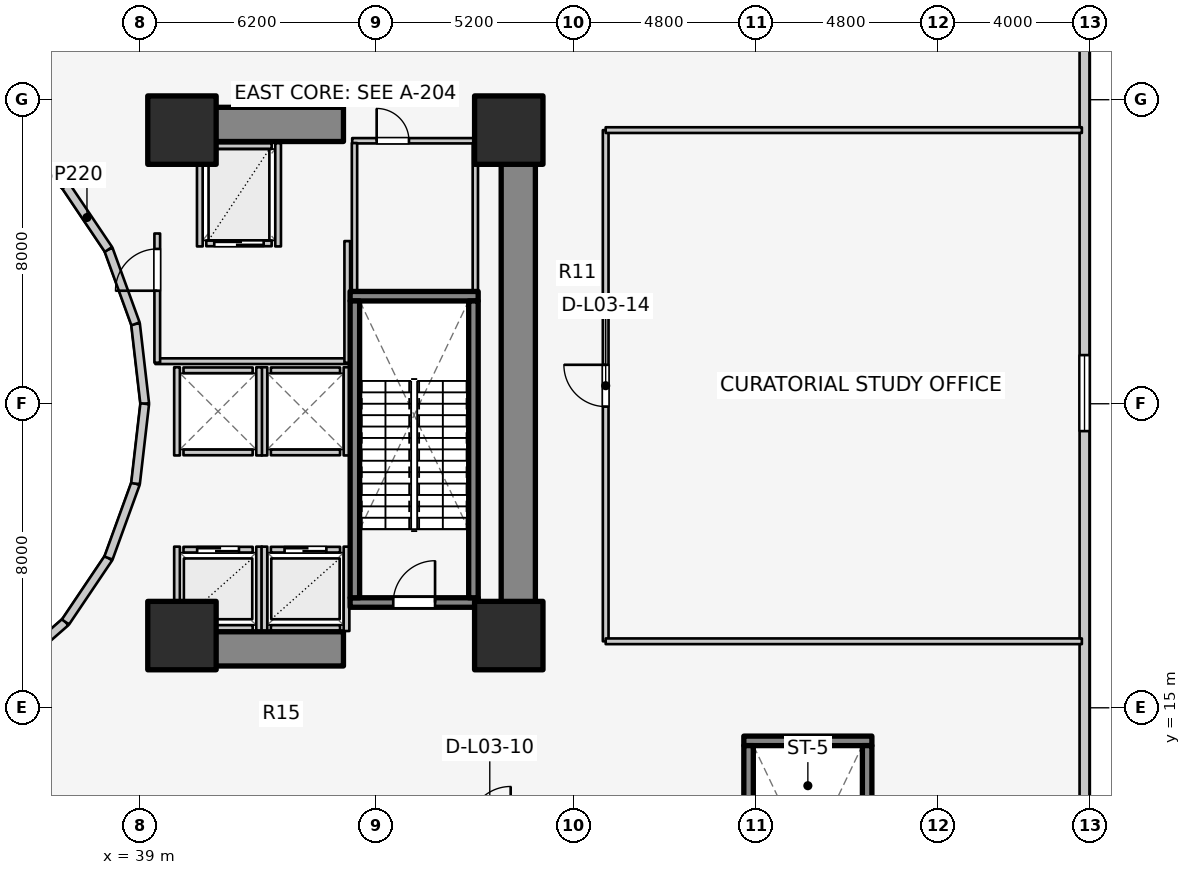
"""IFC4 building model, lengths in metres.
Left out: names, types, materials, properties, quantities, classifications, styles, units other than length and angle.
Written with IfcOpenShell. Run it as: python <this file> out.ifc"""

import sys

from ifc_helpers import new_model, si_unit, direction, frame, frame_2d, origin, origin_2d, place, context, subcontext, project, spatial, rectangle, extrude, element, fill, save


model = new_model("IFC4")
c1 = context("Model", 3, precision=1e-05, world=origin(), true_north=direction((0.0, 1.0)))
c2 = subcontext(c1, "Body", "Model", "MODEL_VIEW")
j1 = project(units=[si_unit("LENGTHUNIT", "METRE"), si_unit("PLANEANGLEUNIT", "RADIAN")], contexts=[c1])
p1 = place(None, origin())
s1 = spatial("IfcSite", under=j1, at=p1, CompositionType="ELEMENT")
p2 = place(p1, origin())
s2 = spatial("IfcBuilding", under=s1, at=p2, CompositionType="ELEMENT")
p3 = place(p2, frame((0.0, 0.0, 9.2)))
s3 = spatial("IfcBuildingStorey", under=s2, at=p3, CompositionType="ELEMENT", Elevation=9.2)
p4 = place(p3, frame((48.95, 17.05, 0.0), z_axis=(0.0, 0.0, 1.0), x_axis=(0.0, 1.0, 0.0)))
e1 = element("IfcWall", 1, at=p4, inside=s3, PredefinedType="SHEAR", context=c2, shape_type="SweptSolid", body=[
    extrude(rectangle(XDim=12.8, YDim=0.9, at=frame_2d((6.4, 0.0))), origin(), (0.0, 0.0, 1.0), 4.6),
])
for number, where, z_axis, x_axis in (
    (2, (39.85, 16.55, 0.0), (0.0, 0.0, 1.0), (1.0, 0.0, 0.0)),
    (3, (39.85, 30.35, 0.0), (0.0, 0.0, 1.0), (1.0, 0.0, 0.0)),
):
    element("IfcWall", number, at=place(p3, frame(where, z_axis=z_axis, x_axis=x_axis)), inside=s3, PredefinedType="SHEAR", context=c2, shape_type="SweptSolid", body=[
        extrude(rectangle(XDim=4.5, YDim=0.9, at=frame_2d((2.25, 0.0))), origin(), (0.0, 0.0, 1.0), 4.6),
    ])
p5 = place(p3, frame((44.525, 17.77, 0.0), z_axis=(0.0, 0.0, 1.0), x_axis=(1.0, 0.0, 0.0)))
e4 = element("IfcWall", 4, at=p5, inside=s3, PredefinedType="SOLIDWALL", context=c2, shape_type="SweptSolid", body=[
    extrude(rectangle(XDim=3.37, YDim=0.25, at=frame_2d((1.685, 0.0))), origin(), (0.0, 0.0, 1.0), 4.6),
])
p6 = place(p5, frame((1.135, 0.0, 0.0)))
e5 = element("IfcOpeningElement", 5, at=p6, cuts=e4, PredefinedType="OPENING", context=c2, shape_type="SweptSolid", body=[
    extrude(rectangle(XDim=1.1, YDim=2.1, at=frame_2d((0.55, 1.05))), frame((0.0, 0.135, 0.0), z_axis=(0.0, -1.0, 0.0), x_axis=(1.0, 0.0, 0.0)), (0.0, 0.0, 1.0), 0.27),
])
p7 = place(p3, frame((44.525, 25.83, 0.0), z_axis=(0.0, 0.0, 1.0), x_axis=(1.0, 0.0, 0.0)))
e6 = element("IfcWall", 6, at=p7, inside=s3, PredefinedType="SOLIDWALL", context=c2, shape_type="SweptSolid", body=[
    extrude(rectangle(XDim=3.37, YDim=0.25, at=frame_2d((1.685, 0.0))), origin(), (0.0, 0.0, 1.0), 4.6),
])
for number, where, z_axis, x_axis in (
    (7, (44.65, 17.895, 0.0), (0.0, 0.0, 1.0), (0.0, 1.0, 0.0)),
    (8, (47.77, 17.895, 0.0), (0.0, 0.0, 1.0), (0.0, 1.0, 0.0)),
):
    element("IfcWall", number, at=place(p3, frame(where, z_axis=z_axis, x_axis=x_axis)), inside=s3, PredefinedType="SOLIDWALL", context=c2, shape_type="SweptSolid", body=[
        extrude(rectangle(XDim=7.81, YDim=0.25, at=frame_2d((3.905, 0.0))), origin(), (0.0, 0.0, 1.0), 4.6),
    ])
p8 = place(p3, frame((54.885, 14.13, 0.0), z_axis=(0.0, 0.0, 1.0), x_axis=(1.0, 0.0, 0.0)))
e9 = element("IfcWall", 9, at=p8, inside=s3, PredefinedType="SOLIDWALL", context=c2, shape_type="SweptSolid", body=[
    extrude(rectangle(XDim=3.37, YDim=0.25, at=frame_2d((1.685, 0.0))), origin(), (0.0, 0.0, 1.0), 4.6),
])
for number, where, z_axis, x_axis in (
    (10, (55.01, 6.195, 0.0), (0.0, 0.0, 1.0), (0.0, 1.0, 0.0)),
    (11, (58.13, 6.195, 0.0), (0.0, 0.0, 1.0), (0.0, 1.0, 0.0)),
):
    element("IfcWall", number, at=place(p3, frame(where, z_axis=z_axis, x_axis=x_axis)), inside=s3, PredefinedType="SOLIDWALL", context=c2, shape_type="SweptSolid", body=[
        extrude(rectangle(XDim=7.81, YDim=0.25, at=frame_2d((3.905, 0.0))), origin(), (0.0, 0.0, 1.0), 4.6),
    ])
for number, where, z_axis, x_axis in (
    (12, (40.1, 16.9, 0.0), (0.0, 0.0, 1.0), (1.0, 0.0, 0.0)),
    (13, (48.7, 16.9, 0.0), (0.0, 0.0, 1.0), (1.0, 0.0, 0.0)),
    (14, (48.7, 30.2, 0.0), (0.0, 0.0, 1.0), (1.0, 0.0, 0.0)),
    (15, (40.1, 30.2, 0.0), (0.0, 0.0, 1.0), (1.0, 0.0, 0.0)),
):
    element("IfcColumn", number, at=place(p3, frame(where, z_axis=z_axis, x_axis=x_axis)), inside=s3, PredefinedType="COLUMN", context=c2, shape_type="SweptSolid", body=[
        extrude(rectangle(XDim=1.8, YDim=1.8, at=origin_2d()), origin(), (0.0, 0.0, 1.0), 4.6),
    ])
p9 = place(p3, frame((63.85, 0.28, 0.0), z_axis=(0.0, 0.0, 1.0), x_axis=(0.0, 1.0, 0.0)))
e16 = element("IfcWall", 16, at=p9, inside=s3, PredefinedType="STANDARD", context=c2, shape_type="SweptSolid", body=[
    extrude(rectangle(XDim=45.44, YDim=0.26, at=frame_2d((22.72, 0.0))), origin(), (0.0, 0.0, 1.0), 4.28),
])
p10 = place(p9, frame((6.0, 0.0, 2.2)))
e17 = element("IfcOpeningElement", 17, at=p10, cuts=e16, PredefinedType="OPENING", context=c2, shape_type="SweptSolid", body=[
    extrude(rectangle(XDim=2.0, YDim=1.1, at=frame_2d((1.0, 0.55))), frame((0.0, 0.14, 0.0), z_axis=(0.0, -1.0, 0.0), x_axis=(1.0, 0.0, 0.0)), (0.0, 0.0, 1.0), 0.28),
])
p11 = place(p9, frame((22.0, 0.0, 2.2)))
e18 = element("IfcOpeningElement", 18, at=p11, cuts=e16, PredefinedType="OPENING", context=c2, shape_type="SweptSolid", body=[
    extrude(rectangle(XDim=2.0, YDim=1.1, at=frame_2d((1.0, 0.55))), frame((0.0, 0.14, 0.0), z_axis=(0.0, -1.0, 0.0), x_axis=(1.0, 0.0, 0.0)), (0.0, 0.0, 1.0), 0.28),
])
p12 = place(p9, frame((38.0, 0.0, 2.2)))
e19 = element("IfcOpeningElement", 19, at=p12, cuts=e16, PredefinedType="OPENING", context=c2, shape_type="SweptSolid", body=[
    extrude(rectangle(XDim=2.0, YDim=1.1, at=frame_2d((1.0, 0.55))), frame((0.0, 0.14, 0.0), z_axis=(0.0, -1.0, 0.0), x_axis=(1.0, 0.0, 0.0)), (0.0, 0.0, 1.0), 0.28),
])
p13 = place(p3, frame((39.12, 23.0, 0.0), z_axis=(0.0, 0.0, 1.0), x_axis=(-0.114711713601, 0.993398823617, 0.0)))
e20 = element("IfcWall", 20, at=p13, inside=s3, PredefinedType="STANDARD", context=c2, shape_type="SweptSolid", body=[
    extrude(rectangle(XDim=2.115, YDim=0.23, at=frame_2d((1.058, 0.0))), origin(), (0.0, 0.0, 1.0), 3.28),
])
p14 = place(p3, frame((38.877, 25.102, 0.0), z_axis=(0.0, 0.0, 1.0), x_axis=(-0.341423187295, 0.93990968033, 0.0)))
e21 = element("IfcWall", 21, at=p14, inside=s3, PredefinedType="STANDARD", context=c2, shape_type="SweptSolid", body=[
    extrude(rectangle(XDim=2.084, YDim=0.23, at=frame_2d((1.042, 0.0))), origin(), (0.0, 0.0, 1.0), 3.28),
])
p15 = place(p3, frame((38.166, 27.06, 0.0), z_axis=(0.0, 0.0, 1.0), x_axis=(-0.558197800898, 0.829707909492, 0.0)))
e22 = element("IfcWall", 22, at=p15, inside=s3, PredefinedType="STANDARD", context=c2, shape_type="SweptSolid", body=[
    extrude(rectangle(XDim=2.027, YDim=0.23, at=frame_2d((1.013, 0.0))), origin(), (0.0, 0.0, 1.0), 3.28),
])
for number, where, z_axis, x_axis in (
    (23, (37.035, 28.742, 0.0), (0.0, 0.0, 1.0), (-0.753, 0.659, 0.0)),
    (24, (35.56, 15.968, 0.0), (0.0, 0.0, 1.0), (0.753, 0.659, 0.0)),
):
    element("IfcWall", number, at=place(p3, frame(where, z_axis=z_axis, x_axis=x_axis)), inside=s3, PredefinedType="STANDARD", context=c2, shape_type="SweptSolid", body=[
        extrude(rectangle(XDim=1.959, YDim=0.23, at=frame_2d((0.98, 0.0))), origin(), (0.0, 0.0, 1.0), 3.28),
    ])
p16 = place(p3, frame((37.035, 17.258, 0.0), z_axis=(0.0, 0.0, 1.0), x_axis=(0.558197800898, 0.829707909492, 0.0)))
e25 = element("IfcWall", 25, at=p16, inside=s3, PredefinedType="STANDARD", context=c2, shape_type="SweptSolid", body=[
    extrude(rectangle(XDim=2.027, YDim=0.23, at=frame_2d((1.013, 0.0))), origin(), (0.0, 0.0, 1.0), 3.28),
])
p17 = place(p3, frame((38.166, 18.94, 0.0), z_axis=(0.0, 0.0, 1.0), x_axis=(0.341423187295, 0.93990968033, 0.0)))
e26 = element("IfcWall", 26, at=p17, inside=s3, PredefinedType="STANDARD", context=c2, shape_type="SweptSolid", body=[
    extrude(rectangle(XDim=2.084, YDim=0.23, at=frame_2d((1.042, 0.0))), origin(), (0.0, 0.0, 1.0), 3.28),
])
p18 = place(p3, frame((38.877, 20.898, 0.0), z_axis=(0.0, 0.0, 1.0), x_axis=(0.114711713601, 0.993398823617, 0.0)))
e27 = element("IfcWall", 27, at=p18, inside=s3, PredefinedType="STANDARD", context=c2, shape_type="SweptSolid", body=[
    extrude(rectangle(XDim=2.115, YDim=0.23, at=frame_2d((1.058, 0.0))), origin(), (0.0, 0.0, 1.0), 3.28),
])
p19 = place(p3, frame((40.14, 19.16, 0.0), z_axis=(0.0, 0.0, 1.0), x_axis=(1.0, 0.0, 0.0)))
e28 = element("IfcWall", 28, at=p19, inside=s3, PredefinedType="SOLIDWALL", context=c2, shape_type="SweptSolid", body=[
    extrude(rectangle(XDim=1.82, YDim=0.15, at=frame_2d((0.91, 0.0))), origin(), (0.0, 0.0, 1.0), 3.62),
])
p20 = place(p19, frame((0.36, 0.0, 0.0)))
e29 = element("IfcOpeningElement", 29, at=p20, cuts=e28, PredefinedType="OPENING", context=c2, shape_type="SweptSolid", body=[
    extrude(rectangle(XDim=1.1, YDim=2.1, at=frame_2d((0.55, 1.05))), frame((0.0, 0.085, 0.0), z_axis=(0.0, -1.0, 0.0), x_axis=(1.0, 0.0, 0.0)), (0.0, 0.0, 1.0), 0.17),
])
p21 = place(p3, frame((40.14, 17.1, 0.0), z_axis=(0.0, 0.0, 1.0), x_axis=(1.0, 0.0, 0.0)))
e30 = element("IfcWall", 30, at=p21, inside=s3, PredefinedType="SOLIDWALL", context=c2, shape_type="SweptSolid", body=[
    extrude(rectangle(XDim=1.82, YDim=0.15, at=frame_2d((0.91, 0.0))), origin(), (0.0, 0.0, 1.0), 3.62),
])
p22 = place(p3, frame((39.97, 17.02, 0.0), z_axis=(0.0, 0.0, 1.0), x_axis=(0.0, 1.0, 0.0)))
e31 = element("IfcWall", 31, at=p22, inside=s3, PredefinedType="SOLIDWALL", context=c2, shape_type="SweptSolid", body=[
    extrude(rectangle(XDim=2.22, YDim=0.15, at=frame_2d((1.11, 0.0))), origin(), (0.0, 0.0, 1.0), 3.3),
])
p23 = place(p3, frame((42.13, 17.02, 0.0), z_axis=(0.0, 0.0, 1.0), x_axis=(0.0, 1.0, 0.0)))
e32 = element("IfcWall", 32, at=p23, inside=s3, PredefinedType="SOLIDWALL", context=c2, shape_type="SweptSolid", body=[
    extrude(rectangle(XDim=2.22, YDim=0.15, at=frame_2d((1.11, 0.0))), origin(), (0.0, 0.0, 1.0), 4.255),
])
p24 = place(p3, frame((42.44, 19.16, 0.0), z_axis=(0.0, 0.0, 1.0), x_axis=(1.0, 0.0, 0.0)))
e33 = element("IfcWall", 33, at=p24, inside=s3, PredefinedType="SOLIDWALL", context=c2, shape_type="SweptSolid", body=[
    extrude(rectangle(XDim=1.82, YDim=0.15, at=frame_2d((0.91, 0.0))), origin(), (0.0, 0.0, 1.0), 4.255),
])
p25 = place(p24, frame((0.36, 0.0, 0.0)))
e34 = element("IfcOpeningElement", 34, at=p25, cuts=e33, PredefinedType="OPENING", context=c2, shape_type="SweptSolid", body=[
    extrude(rectangle(XDim=1.1, YDim=2.1, at=frame_2d((0.55, 1.05))), frame((0.0, 0.085, 0.0), z_axis=(0.0, -1.0, 0.0), x_axis=(1.0, 0.0, 0.0)), (0.0, 0.0, 1.0), 0.17),
])
p26 = place(p3, frame((42.44, 17.1, 0.0), z_axis=(0.0, 0.0, 1.0), x_axis=(1.0, 0.0, 0.0)))
e35 = element("IfcWall", 35, at=p26, inside=s3, PredefinedType="SOLIDWALL", context=c2, shape_type="SweptSolid", body=[
    extrude(rectangle(XDim=1.82, YDim=0.15, at=frame_2d((0.91, 0.0))), origin(), (0.0, 0.0, 1.0), 4.255),
])
p27 = place(p3, frame((42.27, 17.02, 0.0), z_axis=(0.0, 0.0, 1.0), x_axis=(0.0, 1.0, 0.0)))
e36 = element("IfcWall", 36, at=p27, inside=s3, PredefinedType="SOLIDWALL", context=c2, shape_type="SweptSolid", body=[
    extrude(rectangle(XDim=2.22, YDim=0.15, at=frame_2d((1.11, 0.0))), origin(), (0.0, 0.0, 1.0), 4.255),
])
p28 = place(p3, frame((44.43, 17.02, 0.0), z_axis=(0.0, 0.0, 1.0), x_axis=(0.0, 1.0, 0.0)))
e37 = element("IfcWall", 37, at=p28, inside=s3, PredefinedType="SOLIDWALL", context=c2, shape_type="SweptSolid", body=[
    extrude(rectangle(XDim=2.22, YDim=0.15, at=frame_2d((1.11, 0.0))), origin(), (0.0, 0.0, 1.0), 3.62),
])
for number, where, z_axis, x_axis in (
    (38, (42.44, 21.72, 0.0), (0.0, 0.0, 1.0), (1.0, 0.0, 0.0)),
    (39, (42.44, 23.88, 0.0), (0.0, 0.0, 1.0), (1.0, 0.0, 0.0)),
):
    element("IfcWall", number, at=place(p3, frame(where, z_axis=z_axis, x_axis=x_axis)), inside=s3, PredefinedType="SOLIDWALL", context=c2, shape_type="SweptSolid", body=[
        extrude(rectangle(XDim=1.82, YDim=0.15, at=frame_2d((0.91, 0.0))), origin(), (0.0, 0.0, 1.0), 4.255),
    ])
for number, where, z_axis, x_axis in (
    (40, (42.27, 21.64, 0.0), (0.0, 0.0, 1.0), (0.0, 1.0, 0.0)),
    (41, (44.43, 21.64, 0.0), (0.0, 0.0, 1.0), (0.0, 1.0, 0.0)),
):
    element("IfcWall", number, at=place(p3, frame(where, z_axis=z_axis, x_axis=x_axis)), inside=s3, PredefinedType="SOLIDWALL", context=c2, shape_type="SweptSolid", body=[
        extrude(rectangle(XDim=2.32, YDim=0.15, at=frame_2d((1.16, 0.0))), origin(), (0.0, 0.0, 1.0), 4.255),
    ])
for number, where, z_axis, x_axis in (
    (42, (40.14, 21.72, 0.0), (0.0, 0.0, 1.0), (1.0, 0.0, 0.0)),
    (43, (40.14, 23.88, 0.0), (0.0, 0.0, 1.0), (1.0, 0.0, 0.0)),
):
    element("IfcWall", number, at=place(p3, frame(where, z_axis=z_axis, x_axis=x_axis)), inside=s3, PredefinedType="SOLIDWALL", context=c2, shape_type="SweptSolid", body=[
        extrude(rectangle(XDim=1.82, YDim=0.15, at=frame_2d((0.91, 0.0))), origin(), (0.0, 0.0, 1.0), 3.62),
    ])
p29 = place(p3, frame((39.97, 21.64, 0.0), z_axis=(0.0, 0.0, 1.0), x_axis=(0.0, 1.0, 0.0)))
e44 = element("IfcWall", 44, at=p29, inside=s3, PredefinedType="SOLIDWALL", context=c2, shape_type="SweptSolid", body=[
    extrude(rectangle(XDim=2.32, YDim=0.15, at=frame_2d((1.16, 0.0))), origin(), (0.0, 0.0, 1.0), 3.62),
])
p30 = place(p3, frame((42.13, 21.64, 0.0), z_axis=(0.0, 0.0, 1.0), x_axis=(0.0, 1.0, 0.0)))
e45 = element("IfcWall", 45, at=p30, inside=s3, PredefinedType="SOLIDWALL", context=c2, shape_type="SweptSolid", body=[
    extrude(rectangle(XDim=2.32, YDim=0.15, at=frame_2d((1.16, 0.0))), origin(), (0.0, 0.0, 1.0), 4.255),
])
p31 = place(p3, frame((40.74, 27.22, 0.0), z_axis=(0.0, 0.0, 1.0), x_axis=(1.0, 0.0, 0.0)))
e46 = element("IfcWall", 46, at=p31, inside=s3, PredefinedType="SOLIDWALL", context=c2, shape_type="SweptSolid", body=[
    extrude(rectangle(XDim=1.72, YDim=0.15, at=frame_2d((0.86, 0.0))), origin(), (0.0, 0.0, 1.0), 4.255),
])
p32 = place(p31, frame((0.21, 0.0, 0.0)))
e47 = element("IfcOpeningElement", 47, at=p32, cuts=e46, PredefinedType="OPENING", context=c2, shape_type="SweptSolid", body=[
    extrude(rectangle(XDim=1.3, YDim=2.1, at=frame_2d((0.65, 1.05))), frame((0.0, 0.085, 0.0), z_axis=(0.0, -1.0, 0.0), x_axis=(1.0, 0.0, 0.0)), (0.0, 0.0, 1.0), 0.17),
])
p33 = place(p3, frame((40.74, 29.78, 0.0), z_axis=(0.0, 0.0, 1.0), x_axis=(1.0, 0.0, 0.0)))
e48 = element("IfcWall", 48, at=p33, inside=s3, PredefinedType="SOLIDWALL", context=c2, shape_type="SweptSolid", body=[
    extrude(rectangle(XDim=1.72, YDim=0.15, at=frame_2d((0.86, 0.0))), origin(), (0.0, 0.0, 1.0), 4.255),
])
for number, where, z_axis, x_axis in (
    (49, (40.57, 27.14, 0.0), (0.0, 0.0, 1.0), (0.0, 1.0, 0.0)),
    (50, (42.63, 27.14, 0.0), (0.0, 0.0, 1.0), (0.0, 1.0, 0.0)),
):
    element("IfcWall", number, at=place(p3, frame(where, z_axis=z_axis, x_axis=x_axis)), inside=s3, PredefinedType="SOLIDWALL", context=c2, shape_type="SweptSolid", body=[
        extrude(rectangle(XDim=2.72, YDim=0.15, at=frame_2d((1.36, 0.0))), origin(), (0.0, 0.0, 1.0), 4.255),
    ])
p34 = place(p3, frame((39.4, 24.12, 0.0), z_axis=(0.0, 0.0, 1.0), x_axis=(1.0, 0.0, 0.0)))
e51 = element("IfcWall", 51, at=p34, inside=s3, PredefinedType="PARTITIONING", context=c2, shape_type="SweptSolid", body=[
    extrude(rectangle(XDim=5.08, YDim=0.15, at=frame_2d((2.54, 0.0))), origin(), (0.0, 0.0, 1.0), 3.62),
])
p35 = place(p3, frame((44.45, 24.08, 0.0), z_axis=(0.0, 0.0, 1.0), x_axis=(0.0, 1.0, 0.0)))
e52 = element("IfcWall", 52, at=p35, inside=s3, PredefinedType="PARTITIONING", context=c2, shape_type="SweptSolid", body=[
    extrude(rectangle(XDim=3.2, YDim=0.15, at=frame_2d((1.6, 0.0))), origin(), (0.0, 0.0, 1.0), 4.255),
])
p36 = place(p3, frame((39.45, 24.08, 0.0), z_axis=(0.0, 0.0, 1.0), x_axis=(0.0, 1.0, 0.0)))
e53 = element("IfcWall", 53, at=p36, inside=s3, PredefinedType="PARTITIONING", context=c2, shape_type="SweptSolid", body=[
    extrude(rectangle(XDim=3.4, YDim=0.15, at=frame_2d((1.7, 0.0))), origin(), (0.0, 0.0, 1.0), 4.255),
])
p37 = place(p36, frame((1.894, 0.0, 0.0)))
e54 = element("IfcOpeningElement", 54, at=p37, cuts=e53, PredefinedType="OPENING", context=c2, shape_type="SweptSolid", body=[
    extrude(rectangle(XDim=1.1, YDim=2.1, at=frame_2d((0.55, 1.05))), frame((0.0, 0.085, 0.0), z_axis=(0.0, -1.0, 0.0), x_axis=(1.0, 0.0, 0.0)), (0.0, 0.0, 1.0), 0.17),
])
p38 = place(p3, frame((51.25, 16.75, 0.0), z_axis=(0.0, 0.0, 1.0), x_axis=(0.0, 1.0, 0.0)))
e55 = element("IfcWall", 55, at=p38, inside=s3, PredefinedType="PARTITIONING", context=c2, shape_type="SweptSolid", body=[
    extrude(rectangle(XDim=13.45, YDim=0.15, at=frame_2d((6.725, 0.0))), origin(), (0.0, 0.0, 1.0), 4.255),
])
p39 = place(p38, frame((6.175, 0.0, 0.0)))
e56 = element("IfcOpeningElement", 56, at=p39, cuts=e55, PredefinedType="OPENING", context=c2, shape_type="SweptSolid", body=[
    extrude(rectangle(XDim=1.1, YDim=2.1, at=frame_2d((0.55, 1.05))), frame((0.0, 0.085, 0.0), z_axis=(0.0, -1.0, 0.0), x_axis=(1.0, 0.0, 0.0)), (0.0, 0.0, 1.0), 0.17),
])
for number, where, z_axis, x_axis in (
    (57, (51.25, 16.75, 0.0), (0.0, 0.0, 1.0), (1.0, 0.0, 0.0)),
    (58, (51.25, 30.2, 0.0), (0.0, 0.0, 1.0), (1.0, 0.0, 0.0)),
):
    element("IfcWall", number, at=place(p3, frame(where, z_axis=z_axis, x_axis=x_axis)), inside=s3, PredefinedType="PARTITIONING", context=c2, shape_type="SweptSolid", body=[
        extrude(rectangle(XDim=12.53, YDim=0.15, at=frame_2d((6.265, 0.0))), origin(), (0.0, 0.0, 1.0), 3.3),
    ])
p40 = place(p3, frame((44.58, 29.92, 0.0), z_axis=(0.0, 0.0, 1.0), x_axis=(1.0, 0.0, 0.0)))
e59 = element("IfcWall", 59, at=p40, inside=s3, PredefinedType="PLUMBINGWALL", context=c2, shape_type="SweptSolid", body=[
    extrude(rectangle(XDim=3.3, YDim=0.14, at=frame_2d((1.65, 0.0))), origin(), (0.0, 0.0, 1.0), 4.255),
])
p41 = place(p40, frame((0.643, 0.0, 0.0)))
e60 = element("IfcOpeningElement", 60, at=p41, cuts=e59, PredefinedType="OPENING", context=c2, shape_type="SweptSolid", body=[
    extrude(rectangle(XDim=0.85, YDim=2.05, at=frame_2d((0.425, 1.025))), frame((0.0, 0.08, 0.0), z_axis=(0.0, -1.0, 0.0), x_axis=(1.0, 0.0, 0.0)), (0.0, 0.0, 1.0), 0.16),
])
for number, where, z_axis, x_axis in (
    (61, (44.64, 25.98, 0.0), (0.0, 0.0, 1.0), (0.0, 1.0, 0.0)),
    (62, (47.82, 25.98, 0.0), (0.0, 0.0, 1.0), (0.0, 1.0, 0.0)),
):
    element("IfcWall", number, at=place(p3, frame(where, z_axis=z_axis, x_axis=x_axis)), inside=s3, PredefinedType="PLUMBINGWALL", context=c2, shape_type="SweptSolid", body=[
        extrude(rectangle(XDim=3.88, YDim=0.14, at=frame_2d((1.94, 0.0))), origin(), (0.0, 0.0, 1.0), 4.255),
    ])
p42 = place(p11, origin())
e63 = element("IfcWindow", 63, at=p42, inside=s3, PartitioningType="SINGLE_PANEL", PredefinedType="WINDOW", context=c2, shape_type="SweptSolid", body=[
    extrude(rectangle(XDim=2.0, YDim=1.1, at=frame_2d((1.0, 0.55))), frame((0.0, 0.03, 0.0), z_axis=(0.0, -1.0, 0.0), x_axis=(1.0, 0.0, 0.0)), (0.0, 0.0, 1.0), 0.06),
])
fill(e18, e63)
p43 = place(p6, origin())
e64 = element("IfcDoor", 64, at=p43, inside=s3, OperationType="SINGLE_SWING_RIGHT", PredefinedType="DOOR", context=c2, shape_type="SweptSolid", body=[
    extrude(rectangle(XDim=1.1, YDim=2.1, at=frame_2d((0.55, 1.05))), frame((0.0, 0.025, 0.0), z_axis=(0.0, -1.0, 0.0), x_axis=(1.0, 0.0, 0.0)), (0.0, 0.0, 1.0), 0.05),
])
fill(e5, e64)
p44 = place(p20, origin())
e65 = element("IfcDoor", 65, at=p44, inside=s3, OperationType="DOUBLE_DOOR_SLIDING", PredefinedType="DOOR", context=c2, shape_type="SweptSolid", body=[
    extrude(rectangle(XDim=1.1, YDim=2.1, at=frame_2d((0.55, 1.05))), frame((0.0, 0.025, 0.0), z_axis=(0.0, -1.0, 0.0), x_axis=(1.0, 0.0, 0.0)), (0.0, 0.0, 1.0), 0.05),
])
fill(e29, e65)
p45 = place(p25, origin())
e66 = element("IfcDoor", 66, at=p45, inside=s3, OperationType="DOUBLE_DOOR_SLIDING", PredefinedType="DOOR", context=c2, shape_type="SweptSolid", body=[
    extrude(rectangle(XDim=1.1, YDim=2.1, at=frame_2d((0.55, 1.05))), frame((0.0, 0.025, 0.0), z_axis=(0.0, -1.0, 0.0), x_axis=(1.0, 0.0, 0.0)), (0.0, 0.0, 1.0), 0.05),
])
fill(e34, e66)
p46 = place(p32, origin())
e67 = element("IfcDoor", 67, at=p46, inside=s3, OperationType="DOUBLE_DOOR_SLIDING", PredefinedType="DOOR", context=c2, shape_type="SweptSolid", body=[
    extrude(rectangle(XDim=1.3, YDim=2.1, at=frame_2d((0.65, 1.05))), frame((0.0, 0.025, 0.0), z_axis=(0.0, -1.0, 0.0), x_axis=(1.0, 0.0, 0.0)), (0.0, 0.0, 1.0), 0.05),
])
fill(e47, e67)
p47 = place(p37, origin())
e68 = element("IfcDoor", 68, at=p47, inside=s3, OperationType="SINGLE_SWING_LEFT", PredefinedType="DOOR", context=c2, shape_type="SweptSolid", body=[
    extrude(rectangle(XDim=1.1, YDim=2.1, at=frame_2d((0.55, 1.05))), frame((0.0, 0.025, 0.0), z_axis=(0.0, -1.0, 0.0), x_axis=(1.0, 0.0, 0.0)), (0.0, 0.0, 1.0), 0.05),
])
fill(e54, e68)
p48 = place(p39, origin())
e69 = element("IfcDoor", 69, at=p48, inside=s3, OperationType="SINGLE_SWING_RIGHT", PredefinedType="DOOR", context=c2, shape_type="SweptSolid", body=[
    extrude(rectangle(XDim=1.1, YDim=2.1, at=frame_2d((0.55, 1.05))), frame((0.0, 0.025, 0.0), z_axis=(0.0, -1.0, 0.0), x_axis=(1.0, 0.0, 0.0)), (0.0, 0.0, 1.0), 0.05),
])
fill(e56, e69)
p49 = place(p41, origin())
e70 = element("IfcDoor", 70, at=p49, inside=s3, OperationType="SINGLE_SWING_LEFT", PredefinedType="DOOR", context=c2, shape_type="SweptSolid", body=[
    extrude(rectangle(XDim=0.85, YDim=2.05, at=frame_2d((0.425, 1.025))), frame((0.0, 0.025, 0.0), z_axis=(0.0, -1.0, 0.0), x_axis=(1.0, 0.0, 0.0)), (0.0, 0.0, 1.0), 0.05),
])
fill(e60, e70)
save(model, sys.argv[1])
